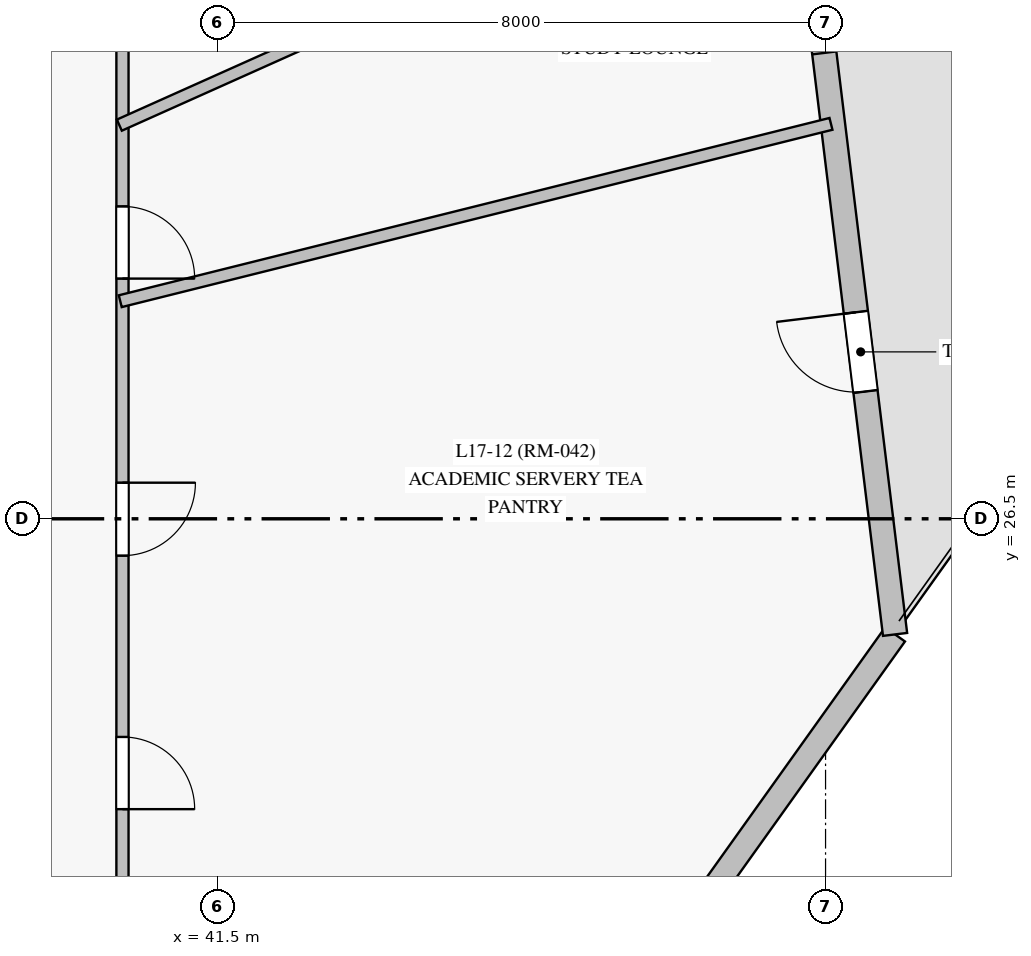
"""IFC4 building model, lengths in metres.
Left out: names, types, materials, properties, quantities, classifications, styles, units other than length and angle.
Written with IfcOpenShell. Run it as: python <this file> out.ifc"""

import sys

from ifc_helpers import new_model, si_unit, direction, frame, frame_2d, origin, origin_with_axes, place, context, subcontext, project, spatial, rectangle, extrude, source, transform, mapped, element, fill, save


model = new_model("IFC4")
c1 = context("Model", 3, precision=1e-05, world=origin(), true_north=direction((0.0, 1.0)))
c2 = subcontext(c1, "Body", "Model", "MODEL_VIEW")
j1 = project(units=[si_unit("LENGTHUNIT", "METRE"), si_unit("PLANEANGLEUNIT", "RADIAN")], contexts=[c1])
p1 = place(None, origin())
s1 = spatial("IfcSite", under=j1, at=p1, CompositionType="ELEMENT")
p2 = place(p1, origin())
s2 = spatial("IfcBuilding", under=s1, at=p2, CompositionType="ELEMENT")
p3 = place(p2, frame((0.0, 0.0, 66.1)))
s3 = spatial("IfcBuildingStorey", under=s2, at=p3, CompositionType="ELEMENT", Elevation=66.1)
p4 = place(p3, frame((44.602, 16.838, 0.0), z_axis=(0.0, 0.0, 1.0), x_axis=(0.581067336178, 0.813855485223, 0.0)))
e1 = element("IfcWall", 1, at=p4, inside=s3, PredefinedType="SOLIDWALL", context=c2, shape_type="SweptSolid", body=[
    extrude(rectangle(XDim=10.003, YDim=0.32, at=frame_2d((5.001, 0.0))), origin(), (0.0, 0.0, 1.0), 3.35),
])
p5 = place(p3, frame((50.415, 24.979, 0.0), z_axis=(0.0, 0.0, 1.0), x_axis=(-0.120844129627, 0.992671494672, 0.0)))
e2 = element("IfcWall", 2, at=p5, inside=s3, PredefinedType="SOLIDWALL", context=c2, shape_type="SweptSolid", body=[
    extrude(rectangle(XDim=17.972, YDim=0.32, at=frame_2d((8.986, 0.0))), origin(), (0.0, 0.0, 1.0), 3.02),
])
p6 = place(p5, frame((7.707, 0.0, 0.85)))
e3 = element("IfcOpeningElement", 3, at=p6, cuts=e2, PredefinedType="OPENING", context=c2, shape_type="SweptSolid", body=[
    extrude(rectangle(XDim=2.1, YDim=1.95, at=frame_2d((1.05, 0.975))), frame((0.0, 0.17, 0.0), z_axis=(0.0, -1.0, 0.0), x_axis=(1.0, 0.0, 0.0)), (0.0, 0.0, 1.0), 0.34),
])
p7 = place(p5, frame((3.219, 0.0, 0.0)))
e4 = element("IfcOpeningElement", 4, at=p7, cuts=e2, PredefinedType="OPENING", context=c2, shape_type="SweptSolid", body=[
    extrude(rectangle(XDim=1.05, YDim=2.12, at=frame_2d((0.525, 1.06))), frame((0.0, 0.17, 0.0), z_axis=(0.0, -1.0, 0.0), x_axis=(1.0, 0.0, 0.0)), (0.0, 0.0, 1.0), 0.34),
])
p8 = place(p3, frame((40.25, 37.65, 0.0), z_axis=(0.0, 0.0, 1.0), x_axis=(0.0, -1.0, 0.0)))
e5 = element("IfcWall", 5, at=p8, inside=s3, PredefinedType="PARTITIONING", context=c2, shape_type="SweptSolid", body=[
    extrude(rectangle(XDim=22.3, YDim=0.16, at=frame_2d((11.15, 0.0))), origin(), (0.0, 0.0, 1.0), 2.75),
])
p9 = place(p8, frame((14.02, 0.0, 0.0)))
e6 = element("IfcOpeningElement", 6, at=p9, cuts=e5, PredefinedType="OPENING", context=c2, shape_type="SweptSolid", body=[
    extrude(rectangle(XDim=0.95, YDim=2.15, at=frame_2d((0.475, 1.075))), frame((0.0, 0.09, 0.0), z_axis=(0.0, -1.0, 0.0), x_axis=(1.0, 0.0, 0.0)), (0.0, 0.0, 1.0), 0.18),
])
p10 = place(p8, frame((10.675, 0.0, 0.0)))
e7 = element("IfcOpeningElement", 7, at=p10, cuts=e5, PredefinedType="OPENING", context=c2, shape_type="SweptSolid", body=[
    extrude(rectangle(XDim=0.96, YDim=2.15, at=frame_2d((0.48, 1.075))), frame((0.0, 0.09, 0.0), z_axis=(0.0, -1.0, 0.0), x_axis=(1.0, 0.0, 0.0)), (0.0, 0.0, 1.0), 0.18),
])
p11 = place(p8, frame((7.04, 0.0, 0.0)))
e8 = element("IfcOpeningElement", 8, at=p11, cuts=e5, PredefinedType="OPENING", context=c2, shape_type="SweptSolid", body=[
    extrude(rectangle(XDim=0.95, YDim=2.15, at=frame_2d((0.475, 1.075))), frame((0.0, 0.09, 0.0), z_axis=(0.0, -1.0, 0.0), x_axis=(1.0, 0.0, 0.0)), (0.0, 0.0, 1.0), 0.18),
])
p12 = place(p8, frame((3.01, 0.0, 0.0)))
e9 = element("IfcOpeningElement", 9, at=p12, cuts=e5, PredefinedType="OPENING", context=c2, shape_type="SweptSolid", body=[
    extrude(rectangle(XDim=0.96, YDim=2.15, at=frame_2d((0.48, 1.075))), frame((0.0, 0.09, 0.0), z_axis=(0.0, -1.0, 0.0), x_axis=(1.0, 0.0, 0.0)), (0.0, 0.0, 1.0), 0.18),
])
p13 = place(p8, frame((1.651, 0.0, 0.0)))
e10 = element("IfcOpeningElement", 10, at=p13, cuts=e5, PredefinedType="OPENING", context=c2, shape_type="SweptSolid", body=[
    extrude(rectangle(XDim=0.96, YDim=2.15, at=frame_2d((0.48, 1.075))), frame((0.0, 0.09, 0.0), z_axis=(0.0, -1.0, 0.0), x_axis=(1.0, 0.0, 0.0)), (0.0, 0.0, 1.0), 0.18),
])
p14 = place(p3, frame((40.209, 31.679, 0.0), z_axis=(0.0, 0.0, 1.0), x_axis=(0.912627841784, 0.408791416741, 0.0)))
e11 = element("IfcWall", 11, at=p14, inside=s3, PredefinedType="PARTITIONING", context=c2, shape_type="SweptSolid", body=[
    extrude(rectangle(XDim=9.728, YDim=0.16, at=frame_2d((4.864, 0.0))), origin(), (0.0, 0.0, 1.0), 3.35),
])
p15 = place(p3, frame((40.221, 29.363, 0.0), z_axis=(0.0, 0.0, 1.0), x_axis=(0.97025416332, 0.242088534549, 0.0)))
e12 = element("IfcWall", 12, at=p15, inside=s3, PredefinedType="PARTITIONING", context=c2, shape_type="SweptSolid", body=[
    extrude(rectangle(XDim=9.637, YDim=0.16, at=frame_2d((4.818, 0.0))), origin(), (0.0, 0.0, 1.0), 3.35),
])
m1 = source(origin_with_axes(), c2, "Body", "SweptSolid", [
    extrude(rectangle(XDim=2.1, YDim=1.95, at=frame_2d((1.05, 0.975))), frame((0.0, 0.03, 0.0), z_axis=(0.0, -1.0, 0.0), x_axis=(1.0, 0.0, 0.0)), (0.0, 0.0, 1.0), 0.06),
])
p16 = place(p6, origin())
e13 = element("IfcWindow", 13, at=p16, inside=s3, PartitioningType="SINGLE_PANEL", PredefinedType="WINDOW", context=c2, shape_type="MappedRepresentation", body=[
    mapped(m1, transform((0.0, 0.0, 0.0), scale=1.0)),
])
fill(e3, e13)
m2 = source(origin_with_axes(), c2, "Body", "SweptSolid", [
    extrude(rectangle(XDim=1.05, YDim=2.12, at=frame_2d((0.525, 1.06))), frame((0.0, 0.025, 0.0), z_axis=(0.0, -1.0, 0.0), x_axis=(1.0, 0.0, 0.0)), (0.0, 0.0, 1.0), 0.05),
])
p17 = place(p7, origin())
e14 = element("IfcDoor", 14, at=p17, inside=s3, OperationType="SINGLE_SWING_RIGHT", PredefinedType="DOOR", context=c2, shape_type="MappedRepresentation", body=[
    mapped(m2, transform((0.0, 0.0, 0.0), scale=1.0)),
])
fill(e4, e14)
m3 = source(origin_with_axes(), c2, "Body", "SweptSolid", [
    extrude(rectangle(XDim=0.95, YDim=2.15, at=frame_2d((0.475, 1.075))), frame((0.0, 0.025, 0.0), z_axis=(0.0, -1.0, 0.0), x_axis=(1.0, 0.0, 0.0)), (0.0, 0.0, 1.0), 0.05),
])
p18 = place(p9, origin())
e15 = element("IfcDoor", 15, at=p18, inside=s3, OperationType="SINGLE_SWING_RIGHT", PredefinedType="DOOR", context=c2, shape_type="MappedRepresentation", body=[
    mapped(m3, transform((0.0, 0.0, 0.0), scale=1.0)),
])
fill(e6, e15)
m4 = source(origin_with_axes(), c2, "Body", "SweptSolid", [
    extrude(rectangle(XDim=0.96, YDim=2.15, at=frame_2d((0.48, 1.075))), frame((0.0, 0.025, 0.0), z_axis=(0.0, -1.0, 0.0), x_axis=(1.0, 0.0, 0.0)), (0.0, 0.0, 1.0), 0.05),
])
p19 = place(p10, origin())
e16 = element("IfcDoor", 16, at=p19, inside=s3, OperationType="SINGLE_SWING_LEFT", PredefinedType="DOOR", context=c2, shape_type="MappedRepresentation", body=[
    mapped(m4, transform((0.0, 0.0, 0.0), scale=1.0)),
])
fill(e7, e16)
p20 = place(p11, origin())
e17 = element("IfcDoor", 17, at=p20, inside=s3, OperationType="SINGLE_SWING_RIGHT", PredefinedType="DOOR", context=c2, shape_type="MappedRepresentation", body=[
    mapped(m3, transform((0.0, 0.0, 0.0), scale=1.0)),
])
fill(e8, e17)
save(model, sys.argv[1])
